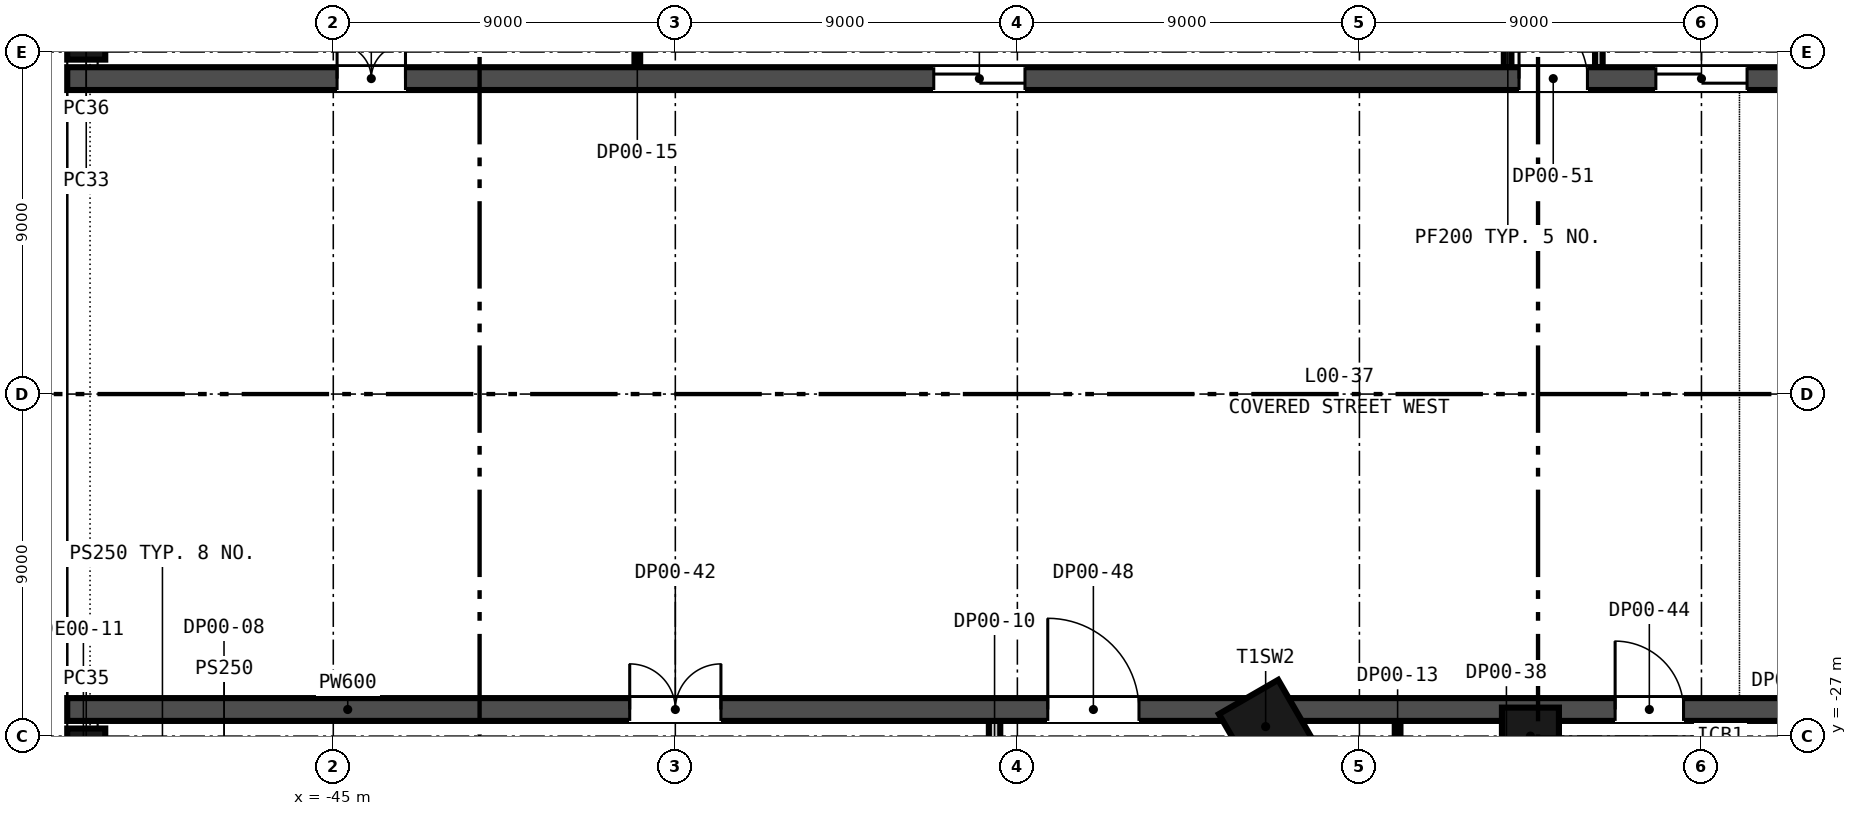
"""IFC4 building model, lengths in metres.
Left out: names, types, materials, properties, quantities, classifications, styles, units other than length and angle.
Written with IfcOpenShell. Run it as: python <this file> out.ifc"""

import sys

from ifc_helpers import new_model, si_unit, direction, frame, frame_2d, origin, origin_2d, place, context, subcontext, project, spatial, rectangle, extrude, element, fill, save


model = new_model("IFC4")
c1 = context("Model", 3, precision=1e-05, world=origin(), true_north=direction((0.0, 1.0)))
c2 = subcontext(c1, "Body", "Model", "MODEL_VIEW")
j1 = project(units=[si_unit("LENGTHUNIT", "METRE"), si_unit("PLANEANGLEUNIT", "RADIAN")], contexts=[c1])
p1 = place(None, origin())
s1 = spatial("IfcSite", under=j1, at=p1, CompositionType="ELEMENT")
p2 = place(p1, origin())
s2 = spatial("IfcBuilding", under=s1, at=p2, CompositionType="ELEMENT")
p3 = place(p2, origin())
s3 = spatial("IfcBuildingStorey", under=s2, at=p3, CompositionType="ELEMENT", Elevation=0.0)
p4 = place(p3, frame((-20.467, -26.75, -0.3), z_axis=(0.0, 0.0, 1.0), x_axis=(0.5, -0.866025403784, 0.0)))
e1 = element("IfcColumn", 1, at=p4, inside=s3, PredefinedType="COLUMN", context=c2, shape_type="SweptSolid", body=[
    extrude(rectangle(XDim=1.8, YDim=1.8, at=origin_2d()), origin(), (0.0, 0.0, 1.0), 8.9),
])
p5 = place(p3, frame((-13.5, -27.0, -0.3), z_axis=(0.0, 0.0, 1.0), x_axis=(1.0, 0.0, 0.0)))
e2 = element("IfcColumn", 2, at=p5, inside=s3, PredefinedType="COLUMN", context=c2, shape_type="SweptSolid", body=[
    extrude(rectangle(XDim=1.5, YDim=1.5, at=origin_2d()), origin(), (0.0, 0.0, 1.0), 8.9),
])
for number, where, z_axis, x_axis in (
    (3, (-51.5, -27.3, -0.3), (0.0, 0.0, 1.0), (0.0, 1.0, 0.0)),
    (4, (-51.5, -8.7, -0.3), (0.0, 0.0, 1.0), (0.0, 1.0, 0.0)),
):
    element("IfcColumn", number, at=place(p3, frame(where, z_axis=z_axis, x_axis=x_axis)), inside=s3, PredefinedType="COLUMN", context=c2, shape_type="SweptSolid", body=[
        extrude(rectangle(XDim=1.0, YDim=1.0, at=origin_2d()), origin(), (0.0, 0.0, 1.0), 8.9),
    ])
p6 = place(p3, frame((-52.0, -26.3, -0.3), z_axis=(0.0, 0.0, 1.0), x_axis=(1.0, 0.0, 0.0)))
e5 = element("IfcWall", 5, at=p6, inside=s3, PredefinedType="SOLIDWALL", context=c2, shape_type="SweptSolid", body=[
    extrude(rectangle(XDim=31.032, YDim=0.6, at=frame_2d((15.516, 0.0))), origin(), (0.0, 0.0, 1.0), 8.9),
])
p7 = place(p6, frame((14.8, 0.0, 0.3)))
e6 = element("IfcOpeningElement", 6, at=p7, cuts=e5, PredefinedType="OPENING", context=c2, shape_type="SweptSolid", body=[
    extrude(rectangle(XDim=2.4, YDim=2.4, at=frame_2d((1.2, 1.2))), frame((0.0, 0.31, 0.0), z_axis=(0.0, -1.0, 0.0), x_axis=(1.0, 0.0, 0.0)), (0.0, 0.0, 1.0), 0.62),
])
p8 = place(p6, frame((25.8, 0.0, 0.3)))
e7 = element("IfcOpeningElement", 7, at=p8, cuts=e5, PredefinedType="OPENING", context=c2, shape_type="SweptSolid", body=[
    extrude(rectangle(XDim=2.4, YDim=2.4, at=frame_2d((1.2, 1.2))), frame((0.0, 0.31, 0.0), z_axis=(0.0, -1.0, 0.0), x_axis=(1.0, 0.0, 0.0)), (0.0, 0.0, 1.0), 0.62),
])
p9 = place(p3, frame((-19.861, -26.3, -0.3), z_axis=(0.0, 0.0, 1.0), x_axis=(1.0, 0.0, 0.0)))
e8 = element("IfcWall", 8, at=p9, inside=s3, PredefinedType="SOLIDWALL", context=c2, shape_type="SweptSolid", body=[
    extrude(rectangle(XDim=71.861, YDim=0.6, at=frame_2d((35.93, 0.0))), origin(), (0.0, 0.0, 1.0), 8.9),
])
p10 = place(p9, frame((54.661, 0.0, 0.3)))
e9 = element("IfcOpeningElement", 9, at=p10, cuts=e8, PredefinedType="OPENING", context=c2, shape_type="SweptSolid", body=[
    extrude(rectangle(XDim=2.4, YDim=2.4, at=frame_2d((1.2, 1.2))), frame((0.0, 0.31, 0.0), z_axis=(0.0, -1.0, 0.0), x_axis=(1.0, 0.0, 0.0)), (0.0, 0.0, 1.0), 0.62),
])
p11 = place(p9, frame((8.589, 0.0, 0.3)))
e10 = element("IfcOpeningElement", 10, at=p11, cuts=e8, PredefinedType="OPENING", context=c2, shape_type="SweptSolid", body=[
    extrude(rectangle(XDim=1.8, YDim=2.4, at=frame_2d((0.9, 1.2))), frame((0.0, 0.31, 0.0), z_axis=(0.0, -1.0, 0.0), x_axis=(1.0, 0.0, 0.0)), (0.0, 0.0, 1.0), 0.62),
])
p12 = place(p9, frame((16.551, 0.0, 0.3)))
e11 = element("IfcOpeningElement", 11, at=p12, cuts=e8, PredefinedType="OPENING", context=c2, shape_type="SweptSolid", body=[
    extrude(rectangle(XDim=1.8, YDim=2.4, at=frame_2d((0.9, 1.2))), frame((0.0, 0.31, 0.0), z_axis=(0.0, -1.0, 0.0), x_axis=(1.0, 0.0, 0.0)), (0.0, 0.0, 1.0), 0.62),
])
p13 = place(p9, frame((24.952, 0.0, 0.3)))
e12 = element("IfcOpeningElement", 12, at=p13, cuts=e8, PredefinedType="OPENING", context=c2, shape_type="SweptSolid", body=[
    extrude(rectangle(XDim=1.8, YDim=2.4, at=frame_2d((0.9, 1.2))), frame((0.0, 0.31, 0.0), z_axis=(0.0, -1.0, 0.0), x_axis=(1.0, 0.0, 0.0)), (0.0, 0.0, 1.0), 0.62),
])
p14 = place(p9, frame((32.914, 0.0, 0.3)))
e13 = element("IfcOpeningElement", 13, at=p14, cuts=e8, PredefinedType="OPENING", context=c2, shape_type="SweptSolid", body=[
    extrude(rectangle(XDim=1.8, YDim=2.4, at=frame_2d((0.9, 1.2))), frame((0.0, 0.31, 0.0), z_axis=(0.0, -1.0, 0.0), x_axis=(1.0, 0.0, 0.0)), (0.0, 0.0, 1.0), 0.62),
])
p15 = place(p9, frame((43.661, 0.0, 0.3)))
e14 = element("IfcOpeningElement", 14, at=p15, cuts=e8, PredefinedType="OPENING", context=c2, shape_type="SweptSolid", body=[
    extrude(rectangle(XDim=2.4, YDim=2.4, at=frame_2d((1.2, 1.2))), frame((0.0, 0.31, 0.0), z_axis=(0.0, -1.0, 0.0), x_axis=(1.0, 0.0, 0.0)), (0.0, 0.0, 1.0), 0.62),
])
p16 = place(p3, frame((-52.0, -9.7, -0.3), z_axis=(0.0, 0.0, 1.0), x_axis=(1.0, 0.0, 0.0)))
e15 = element("IfcWall", 15, at=p16, inside=s3, PredefinedType="SOLIDWALL", context=c2, shape_type="SweptSolid", body=[
    extrude(rectangle(XDim=104.0, YDim=0.6, at=frame_2d((52.0, 0.0))), origin(), (0.0, 0.0, 1.0), 8.9),
])
p17 = place(p16, frame((67.4, 0.0, 0.3)))
e16 = element("IfcOpeningElement", 16, at=p17, cuts=e15, PredefinedType="OPENING", context=c2, shape_type="SweptSolid", body=[
    extrude(rectangle(XDim=1.2, YDim=2.1, at=frame_2d((0.6, 1.05))), frame((0.0, 0.31, 0.0), z_axis=(0.0, -1.0, 0.0), x_axis=(1.0, 0.0, 0.0)), (0.0, 0.0, 1.0), 0.62),
])
p18 = place(p16, frame((38.2, 0.0, 0.3)))
e17 = element("IfcOpeningElement", 17, at=p18, cuts=e15, PredefinedType="OPENING", context=c2, shape_type="SweptSolid", body=[
    extrude(rectangle(XDim=1.8, YDim=2.4, at=frame_2d((0.9, 1.2))), frame((0.0, 0.31, 0.0), z_axis=(0.0, -1.0, 0.0), x_axis=(1.0, 0.0, 0.0)), (0.0, 0.0, 1.0), 0.62),
])
p19 = place(p16, frame((64.0, 0.0, 0.3)))
e18 = element("IfcOpeningElement", 18, at=p19, cuts=e15, PredefinedType="OPENING", context=c2, shape_type="SweptSolid", body=[
    extrude(rectangle(XDim=1.8, YDim=2.4, at=frame_2d((0.9, 1.2))), frame((0.0, 0.31, 0.0), z_axis=(0.0, -1.0, 0.0), x_axis=(1.0, 0.0, 0.0)), (0.0, 0.0, 1.0), 0.62),
])
p20 = place(p16, frame((41.8, 0.0, 0.3)))
e19 = element("IfcOpeningElement", 19, at=p20, cuts=e15, PredefinedType="OPENING", context=c2, shape_type="SweptSolid", body=[
    extrude(rectangle(XDim=2.4, YDim=2.4, at=frame_2d((1.2, 1.2))), frame((0.0, 0.31, 0.0), z_axis=(0.0, -1.0, 0.0), x_axis=(1.0, 0.0, 0.0)), (0.0, 0.0, 1.0), 0.62),
])
p21 = place(p16, frame((59.8, 0.0, 0.3)))
e20 = element("IfcOpeningElement", 20, at=p21, cuts=e15, PredefinedType="OPENING", context=c2, shape_type="SweptSolid", body=[
    extrude(rectangle(XDim=2.4, YDim=2.4, at=frame_2d((1.2, 1.2))), frame((0.0, 0.31, 0.0), z_axis=(0.0, -1.0, 0.0), x_axis=(1.0, 0.0, 0.0)), (0.0, 0.0, 1.0), 0.62),
])
p22 = place(p16, frame((22.8, 0.0, 0.3)))
e21 = element("IfcOpeningElement", 21, at=p22, cuts=e15, PredefinedType="OPENING", context=c2, shape_type="SweptSolid", body=[
    extrude(rectangle(XDim=2.4, YDim=2.4, at=frame_2d((1.2, 1.2))), frame((0.0, 0.31, 0.0), z_axis=(0.0, -1.0, 0.0), x_axis=(1.0, 0.0, 0.0)), (0.0, 0.0, 1.0), 0.62),
])
p23 = place(p16, frame((78.8, 0.0, 0.3)))
e22 = element("IfcOpeningElement", 22, at=p23, cuts=e15, PredefinedType="OPENING", context=c2, shape_type="SweptSolid", body=[
    extrude(rectangle(XDim=2.4, YDim=2.4, at=frame_2d((1.2, 1.2))), frame((0.0, 0.31, 0.0), z_axis=(0.0, -1.0, 0.0), x_axis=(1.0, 0.0, 0.0)), (0.0, 0.0, 1.0), 0.62),
])
p24 = place(p16, frame((7.1, 0.0, 0.3)))
e23 = element("IfcOpeningElement", 23, at=p24, cuts=e15, PredefinedType="OPENING", context=c2, shape_type="SweptSolid", body=[
    extrude(rectangle(XDim=1.8, YDim=2.4, at=frame_2d((0.9, 1.2))), frame((0.0, 0.31, 0.0), z_axis=(0.0, -1.0, 0.0), x_axis=(1.0, 0.0, 0.0)), (0.0, 0.0, 1.0), 0.62),
])
p25 = place(p16, frame((95.1, 0.0, 0.3)))
e24 = element("IfcOpeningElement", 24, at=p25, cuts=e15, PredefinedType="OPENING", context=c2, shape_type="SweptSolid", body=[
    extrude(rectangle(XDim=1.8, YDim=2.4, at=frame_2d((0.9, 1.2))), frame((0.0, 0.31, 0.0), z_axis=(0.0, -1.0, 0.0), x_axis=(1.0, 0.0, 0.0)), (0.0, 0.0, 1.0), 0.62),
])
p26 = place(p3, frame((-37.0, -9.4, 0.0), z_axis=(0.0, 0.0, 1.0), x_axis=(0.0, 1.0, 0.0)))
e25 = element("IfcWall", 25, at=p26, inside=s3, PredefinedType="PARTITIONING", context=c2, shape_type="SweptSolid", body=[
    extrude(rectangle(XDim=9.25, YDim=0.15, at=frame_2d((4.625, 0.0))), origin(), (0.0, 0.0, 1.0), 8.6),
])
p27 = place(p26, frame((3.65, 0.0, 0.0)))
e26 = element("IfcOpeningElement", 26, at=p27, cuts=e25, PredefinedType="OPENING", context=c2, shape_type="SweptSolid", body=[
    extrude(rectangle(XDim=1.8, YDim=2.4, at=frame_2d((0.9, 1.2))), frame((0.0, 0.085, 0.0), z_axis=(0.0, -1.0, 0.0), x_axis=(1.0, 0.0, 0.0)), (0.0, 0.0, 1.0), 0.17),
])
p28 = place(p3, frame((-27.6, -40.0, 0.0), z_axis=(0.0, 0.0, 1.0), x_axis=(0.0, 1.0, 0.0)))
e27 = element("IfcWall", 27, at=p28, inside=s3, PredefinedType="PARTITIONING", context=c2, shape_type="SweptSolid", body=[
    extrude(rectangle(XDim=13.4, YDim=0.3, at=frame_2d((6.7, 0.0))), origin(), (0.0, 0.0, 1.0), 8.6),
])
p29 = place(p28, frame((5.9, 0.0, 0.0)))
e28 = element("IfcOpeningElement", 28, at=p29, cuts=e27, PredefinedType="OPENING", context=c2, shape_type="SweptSolid", body=[
    extrude(rectangle(XDim=1.8, YDim=2.4, at=frame_2d((0.9, 1.2))), frame((0.0, 0.16, 0.0), z_axis=(0.0, -1.0, 0.0), x_axis=(1.0, 0.0, 0.0)), (0.0, 0.0, 1.0), 0.32),
])
p30 = place(p3, frame((-16.995, -31.681, 0.0), z_axis=(0.0, 0.0, 1.0), x_axis=(0.0, 1.0, 0.0)))
e29 = element("IfcWall", 29, at=p30, inside=s3, PredefinedType="PARTITIONING", context=c2, shape_type="SweptSolid", body=[
    extrude(rectangle(XDim=5.081, YDim=0.15, at=frame_2d((2.54, 0.0))), origin(), (0.0, 0.0, 1.0), 8.6),
])
p31 = place(p30, frame((2.15, 0.0, 0.0)))
e30 = element("IfcOpeningElement", 30, at=p31, cuts=e29, PredefinedType="OPENING", context=c2, shape_type="SweptSolid", body=[
    extrude(rectangle(XDim=1.0, YDim=2.1, at=frame_2d((0.5, 1.05))), frame((0.0, 0.085, 0.0), z_axis=(0.0, -1.0, 0.0), x_axis=(1.0, 0.0, 0.0)), (0.0, 0.0, 1.0), 0.17),
])
for number, where, z_axis, x_axis in (
    (31, (-14.1, -9.4, 0.0), (0.0, 0.0, 1.0), (0.0, 1.0, 0.0)),
    (32, (-11.7, -9.4, 0.0), (0.0, 0.0, 1.0), (0.0, 1.0, 0.0)),
):
    element("IfcWall", number, at=place(p3, frame(where, z_axis=z_axis, x_axis=x_axis)), inside=s3, PredefinedType="PARTITIONING", context=c2, shape_type="SweptSolid", body=[
        extrude(rectangle(XDim=9.4, YDim=0.2, at=frame_2d((4.7, 0.0))), origin(), (0.0, 0.0, 1.0), 8.6),
    ])
p32 = place(p7, origin())
e33 = element("IfcDoor", 33, at=p32, inside=s3, OperationType="SINGLE_SWING_LEFT", PredefinedType="DOOR", context=c2, shape_type="SweptSolid", body=[
    extrude(rectangle(XDim=2.4, YDim=2.4, at=frame_2d((1.2, 1.2))), frame((0.0, 0.025, 0.0), z_axis=(0.0, -1.0, 0.0), x_axis=(1.0, 0.0, 0.0)), (0.0, 0.0, 1.0), 0.05),
])
fill(e6, e33)
p33 = place(p11, origin())
e34 = element("IfcDoor", 34, at=p33, inside=s3, OperationType="SINGLE_SWING_LEFT", PredefinedType="DOOR", context=c2, shape_type="SweptSolid", body=[
    extrude(rectangle(XDim=1.8, YDim=2.4, at=frame_2d((0.9, 1.2))), frame((0.0, 0.025, 0.0), z_axis=(0.0, -1.0, 0.0), x_axis=(1.0, 0.0, 0.0)), (0.0, 0.0, 1.0), 0.05),
])
fill(e10, e34)
p34 = place(p8, origin())
e35 = element("IfcDoor", 35, at=p34, inside=s3, OperationType="SINGLE_SWING_LEFT", PredefinedType="DOOR", context=c2, shape_type="SweptSolid", body=[
    extrude(rectangle(XDim=2.4, YDim=2.4, at=frame_2d((1.2, 1.2))), frame((0.0, 0.025, 0.0), z_axis=(0.0, -1.0, 0.0), x_axis=(1.0, 0.0, 0.0)), (0.0, 0.0, 1.0), 0.05),
])
fill(e7, e35)
p35 = place(p18, frame((1.8, 0.0, 0.0), z_axis=(0.0, 0.0, 1.0), x_axis=(-1.0, 0.0, 0.0)))
e36 = element("IfcDoor", 36, at=p35, inside=s3, OperationType="SINGLE_SWING_LEFT", PredefinedType="DOOR", context=c2, shape_type="SweptSolid", body=[
    extrude(rectangle(XDim=1.8, YDim=2.4, at=frame_2d((0.9, 1.2))), frame((0.0, 0.025, 0.0), z_axis=(0.0, -1.0, 0.0), x_axis=(1.0, 0.0, 0.0)), (0.0, 0.0, 1.0), 0.05),
])
fill(e17, e36)
p36 = place(p20, frame((2.4, 0.0, 0.0), z_axis=(0.0, 0.0, 1.0), x_axis=(-1.0, 0.0, 0.0)))
e37 = element("IfcDoor", 37, at=p36, inside=s3, OperationType="SINGLE_SWING_LEFT", PredefinedType="DOOR", context=c2, shape_type="SweptSolid", body=[
    extrude(rectangle(XDim=2.4, YDim=2.4, at=frame_2d((1.2, 1.2))), frame((0.0, 0.025, 0.0), z_axis=(0.0, -1.0, 0.0), x_axis=(1.0, 0.0, 0.0)), (0.0, 0.0, 1.0), 0.05),
])
fill(e19, e37)
p37 = place(p22, frame((2.4, 0.0, 0.0), z_axis=(0.0, 0.0, 1.0), x_axis=(-1.0, 0.0, 0.0)))
e38 = element("IfcDoor", 38, at=p37, inside=s3, OperationType="SINGLE_SWING_LEFT", PredefinedType="DOOR", context=c2, shape_type="SweptSolid", body=[
    extrude(rectangle(XDim=2.4, YDim=2.4, at=frame_2d((1.2, 1.2))), frame((0.0, 0.025, 0.0), z_axis=(0.0, -1.0, 0.0), x_axis=(1.0, 0.0, 0.0)), (0.0, 0.0, 1.0), 0.05),
])
fill(e21, e38)
p38 = place(p24, frame((1.8, 0.0, 0.0), z_axis=(0.0, 0.0, 1.0), x_axis=(-1.0, 0.0, 0.0)))
e39 = element("IfcDoor", 39, at=p38, inside=s3, OperationType="SINGLE_SWING_LEFT", PredefinedType="DOOR", context=c2, shape_type="SweptSolid", body=[
    extrude(rectangle(XDim=1.8, YDim=2.4, at=frame_2d((0.9, 1.2))), frame((0.0, 0.025, 0.0), z_axis=(0.0, -1.0, 0.0), x_axis=(1.0, 0.0, 0.0)), (0.0, 0.0, 1.0), 0.05),
])
fill(e23, e39)
save(model, sys.argv[1])
